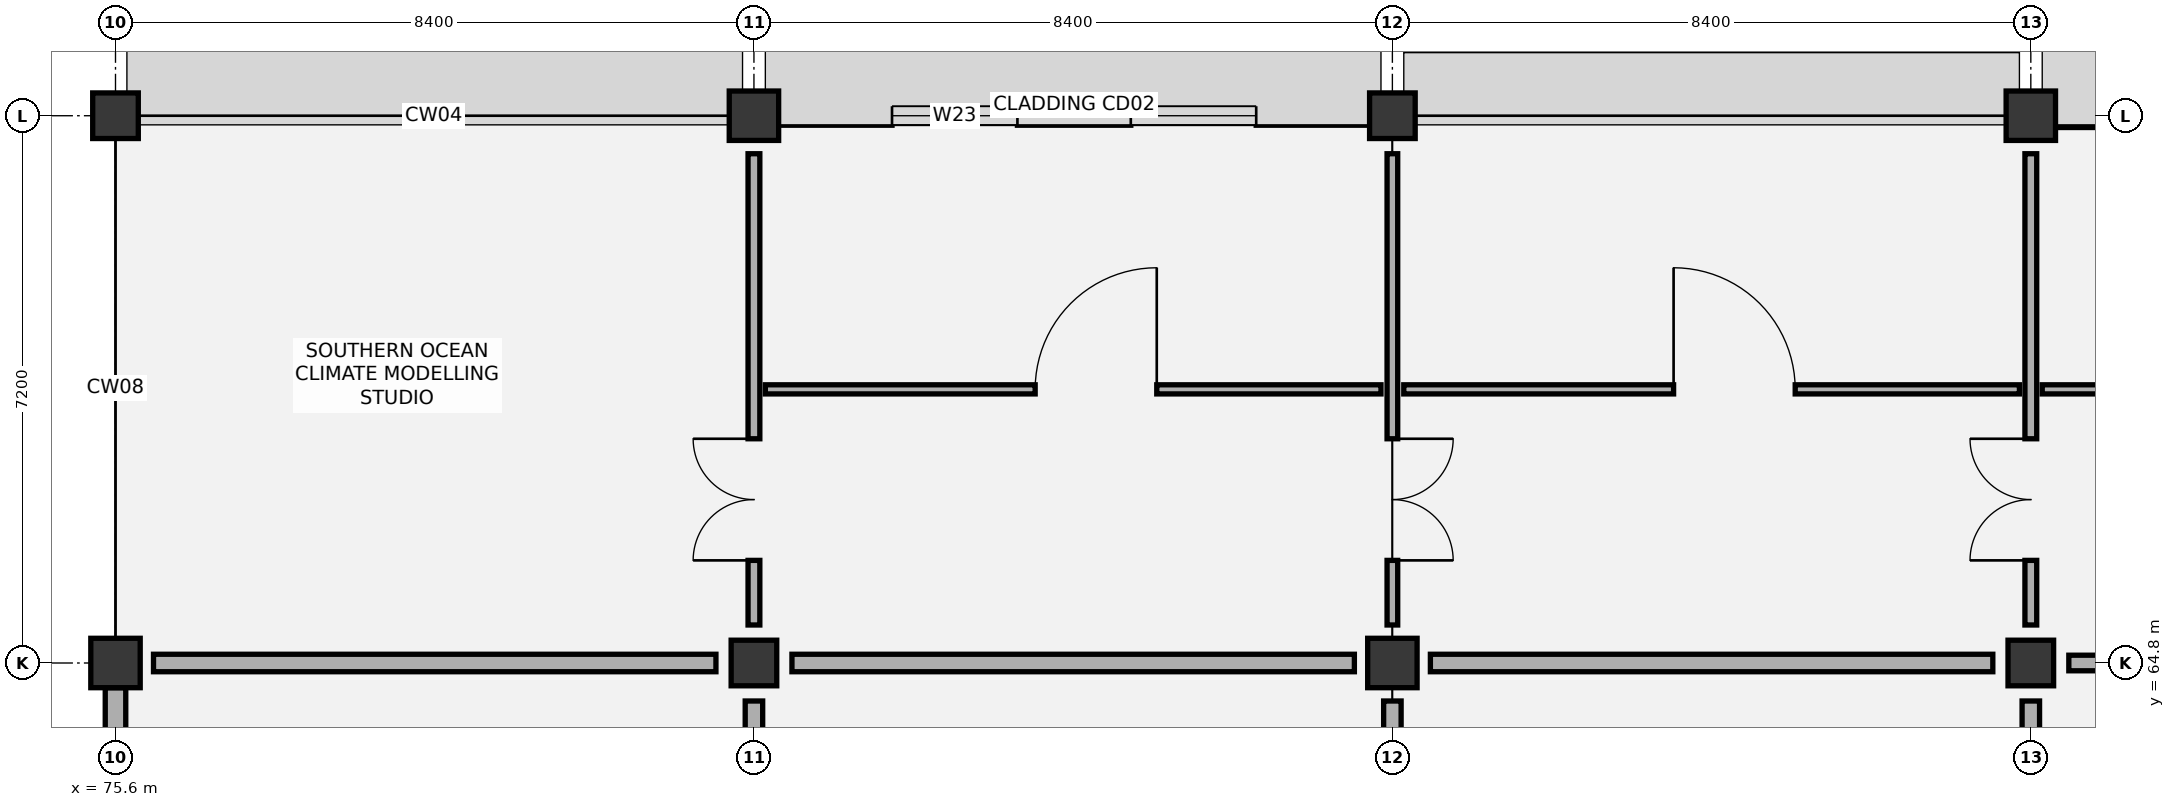
"""IFC4 building model, lengths in metres.
Left out: names, types, materials, properties, quantities, classifications, styles, units other than length and angle.
Written with IfcOpenShell. Run it as: python <this file> out.ifc"""

import sys

from ifc_helpers import new_model, si_unit, direction, frame, frame_2d, origin, origin_2d, place, context, subcontext, project, spatial, rectangle, extrude, element, fill, save


model = new_model("IFC4")
c1 = context("Model", 3, precision=1e-05, world=origin(), true_north=direction((0.0, 1.0)))
c2 = subcontext(c1, "Body", "Model", "MODEL_VIEW")
j1 = project(units=[si_unit("LENGTHUNIT", "METRE"), si_unit("PLANEANGLEUNIT", "RADIAN")], contexts=[c1])
p1 = place(None, origin())
s1 = spatial("IfcSite", under=j1, at=p1, CompositionType="ELEMENT")
p2 = place(p1, origin())
s2 = spatial("IfcBuilding", under=s1, at=p2, CompositionType="ELEMENT")
p3 = place(p2, frame((0.0, 0.0, 52.2)))
s3 = spatial("IfcBuildingStorey", under=s2, at=p3, CompositionType="ELEMENT", Elevation=52.2)
p4 = place(p3, frame((75.6, 64.8, 0.0), z_axis=(0.0, 0.0, 1.0), x_axis=(1.0, 0.0, 0.0)))
e1 = element("IfcColumn", 1, at=p4, inside=s3, PredefinedType="COLUMN", context=c2, shape_type="SweptSolid", body=[
    extrude(rectangle(XDim=0.65, YDim=0.65, at=origin_2d()), origin(), (0.0, 0.0, 1.0), 4.2),
])
for number, where, z_axis, x_axis in (
    (2, (75.6, 72.0, 0.0), (0.0, 0.0, 1.0), (1.0, 0.0, 0.0)),
    (3, (84.0, 64.8, 0.0), (0.0, 0.0, 1.0), (1.0, 0.0, 0.0)),
):
    element("IfcColumn", number, at=place(p3, frame(where, z_axis=z_axis, x_axis=x_axis)), inside=s3, PredefinedType="COLUMN", context=c2, shape_type="SweptSolid", body=[
        extrude(rectangle(XDim=0.6, YDim=0.6, at=origin_2d()), origin(), (0.0, 0.0, 1.0), 4.2),
    ])
for number, where, z_axis, x_axis in (
    (4, (84.0, 72.0, 0.0), (0.0, 0.0, 1.0), (1.0, 0.0, 0.0)),
    (5, (92.4, 64.8, 0.0), (0.0, 0.0, 1.0), (1.0, 0.0, 0.0)),
):
    element("IfcColumn", number, at=place(p3, frame(where, z_axis=z_axis, x_axis=x_axis)), inside=s3, PredefinedType="COLUMN", context=c2, shape_type="SweptSolid", body=[
        extrude(rectangle(XDim=0.65, YDim=0.65, at=origin_2d()), origin(), (0.0, 0.0, 1.0), 4.2),
    ])
for number, where, z_axis, x_axis in (
    (6, (92.4, 72.0, 0.0), (0.0, 0.0, 1.0), (1.0, 0.0, 0.0)),
    (7, (100.8, 64.8, 0.0), (0.0, 0.0, 1.0), (1.0, 0.0, 0.0)),
):
    element("IfcColumn", number, at=place(p3, frame(where, z_axis=z_axis, x_axis=x_axis)), inside=s3, PredefinedType="COLUMN", context=c2, shape_type="SweptSolid", body=[
        extrude(rectangle(XDim=0.6, YDim=0.6, at=origin_2d()), origin(), (0.0, 0.0, 1.0), 4.2),
    ])
p5 = place(p3, frame((100.8, 72.0, 0.0), z_axis=(0.0, 0.0, 1.0), x_axis=(1.0, 0.0, 0.0)))
e8 = element("IfcColumn", 8, at=p5, inside=s3, PredefinedType="COLUMN", context=c2, shape_type="SweptSolid", body=[
    extrude(rectangle(XDim=0.65, YDim=0.65, at=origin_2d()), origin(), (0.0, 0.0, 1.0), 4.2),
])
p6 = place(p3, frame((75.6, 57.9, 0.0), z_axis=(0.0, 0.0, 1.0), x_axis=(0.0, 1.0, 0.0)))
e9 = element("IfcWall", 9, at=p6, inside=s3, PredefinedType="SOLIDWALL", context=c2, shape_type="SweptSolid", body=[
    extrude(rectangle(XDim=6.575, YDim=0.27, at=frame_2d((3.288, 0.0))), origin(), (0.0, 0.0, 1.0), 3.365),
])
p7 = place(p6, frame((1.392, 0.0, 0.95)))
e10 = element("IfcOpeningElement", 10, at=p7, cuts=e9, PredefinedType="OPENING", context=c2, shape_type="SweptSolid", body=[
    extrude(rectangle(XDim=1.2, YDim=1.5, at=frame_2d((0.6, 0.75))), frame((0.0, 0.145, 0.0), z_axis=(0.0, -1.0, 0.0), x_axis=(1.0, 0.0, 0.0)), (0.0, 0.0, 1.0), 0.29),
])
p8 = place(p6, frame((3.983, 0.0, 0.95)))
e11 = element("IfcOpeningElement", 11, at=p8, cuts=e9, PredefinedType="OPENING", context=c2, shape_type="SweptSolid", body=[
    extrude(rectangle(XDim=1.2, YDim=1.5, at=frame_2d((0.6, 0.75))), frame((0.0, 0.145, 0.0), z_axis=(0.0, -1.0, 0.0), x_axis=(1.0, 0.0, 0.0)), (0.0, 0.0, 1.0), 0.29),
])
p9 = place(p3, frame((84.325, 72.0, 0.0), z_axis=(0.0, 0.0, 1.0), x_axis=(1.0, 0.0, 0.0)))
e12 = element("IfcWall", 12, at=p9, inside=s3, PredefinedType="SOLIDWALL", context=c2, shape_type="SweptSolid", body=[
    extrude(rectangle(XDim=7.775, YDim=0.25, at=frame_2d((3.888, 0.0))), origin(), (0.0, 0.0, 1.0), 3.365),
])
p10 = place(p9, frame((1.492, 0.0, 0.95)))
e13 = element("IfcOpeningElement", 13, at=p10, cuts=e12, PredefinedType="OPENING", context=c2, shape_type="SweptSolid", body=[
    extrude(rectangle(XDim=1.65, YDim=1.65, at=frame_2d((0.825, 0.825))), frame((0.0, 0.135, 0.0), z_axis=(0.0, -1.0, 0.0), x_axis=(1.0, 0.0, 0.0)), (0.0, 0.0, 1.0), 0.27),
])
p11 = place(p9, frame((4.633, 0.0, 0.95)))
e14 = element("IfcOpeningElement", 14, at=p11, cuts=e12, PredefinedType="OPENING", context=c2, shape_type="SweptSolid", body=[
    extrude(rectangle(XDim=1.65, YDim=1.65, at=frame_2d((0.825, 0.825))), frame((0.0, 0.135, 0.0), z_axis=(0.0, -1.0, 0.0), x_axis=(1.0, 0.0, 0.0)), (0.0, 0.0, 1.0), 0.27),
])
p12 = place(p3, frame((101.125, 72.0, 0.0), z_axis=(0.0, 0.0, 1.0), x_axis=(1.0, 0.0, 0.0)))
e15 = element("IfcWall", 15, at=p12, inside=s3, PredefinedType="SOLIDWALL", context=c2, shape_type="SweptSolid", body=[
    extrude(rectangle(XDim=7.775, YDim=0.31, at=frame_2d((3.887, 0.0))), origin(), (0.0, 0.0, 1.0), 3.365),
])
p13 = place(p12, frame((1.792, 0.0, 0.95)))
e16 = element("IfcOpeningElement", 16, at=p13, cuts=e15, PredefinedType="OPENING", context=c2, shape_type="SweptSolid", body=[
    extrude(rectangle(XDim=1.2, YDim=1.5, at=frame_2d((0.6, 0.75))), frame((0.0, 0.165, 0.0), z_axis=(0.0, -1.0, 0.0), x_axis=(1.0, 0.0, 0.0)), (0.0, 0.0, 1.0), 0.33),
])
p14 = place(p12, frame((4.783, 0.0, 0.95)))
e17 = element("IfcOpeningElement", 17, at=p14, cuts=e15, PredefinedType="OPENING", context=c2, shape_type="SweptSolid", body=[
    extrude(rectangle(XDim=1.2, YDim=1.5, at=frame_2d((0.6, 0.75))), frame((0.0, 0.165, 0.0), z_axis=(0.0, -1.0, 0.0), x_axis=(1.0, 0.0, 0.0)), (0.0, 0.0, 1.0), 0.33),
])
p15 = place(p3, frame((84.15, 68.4, 0.0), z_axis=(0.0, 0.0, 1.0), x_axis=(1.0, 0.0, 0.0)))
e18 = element("IfcWall", 18, at=p15, inside=s3, PredefinedType="PARTITIONING", context=c2, shape_type="SweptSolid", body=[
    extrude(rectangle(XDim=8.1, YDim=0.12, at=frame_2d((4.05, 0.0))), origin(), (0.0, 0.0, 1.0), 3.92),
])
p16 = place(p15, frame((3.55, 0.0, 0.0)))
e19 = element("IfcOpeningElement", 19, at=p16, cuts=e18, PredefinedType="OPENING", context=c2, shape_type="SweptSolid", body=[
    extrude(rectangle(XDim=1.6, YDim=2.2, at=frame_2d((0.8, 1.1))), frame((0.0, 0.07, 0.0), z_axis=(0.0, -1.0, 0.0), x_axis=(1.0, 0.0, 0.0)), (0.0, 0.0, 1.0), 0.14),
])
p17 = place(p3, frame((92.55, 68.4, 0.0), z_axis=(0.0, 0.0, 1.0), x_axis=(1.0, 0.0, 0.0)))
e20 = element("IfcWall", 20, at=p17, inside=s3, PredefinedType="PARTITIONING", context=c2, shape_type="SweptSolid", body=[
    extrude(rectangle(XDim=8.1, YDim=0.12, at=frame_2d((4.05, 0.0))), origin(), (0.0, 0.0, 1.0), 3.92),
])
p18 = place(p17, frame((3.55, 0.0, 0.0)))
e21 = element("IfcOpeningElement", 21, at=p18, cuts=e20, PredefinedType="OPENING", context=c2, shape_type="SweptSolid", body=[
    extrude(rectangle(XDim=1.6, YDim=2.2, at=frame_2d((0.8, 1.1))), frame((0.0, 0.07, 0.0), z_axis=(0.0, -1.0, 0.0), x_axis=(1.0, 0.0, 0.0)), (0.0, 0.0, 1.0), 0.14),
])
p19 = place(p3, frame((100.95, 68.4, 0.0), z_axis=(0.0, 0.0, 1.0), x_axis=(1.0, 0.0, 0.0)))
e22 = element("IfcWall", 22, at=p19, inside=s3, PredefinedType="PARTITIONING", context=c2, shape_type="SweptSolid", body=[
    extrude(rectangle(XDim=8.1, YDim=0.12, at=frame_2d((4.05, 0.0))), origin(), (0.0, 0.0, 1.0), 3.92),
])
p20 = place(p19, frame((3.55, 0.0, 0.0)))
e23 = element("IfcOpeningElement", 23, at=p20, cuts=e22, PredefinedType="OPENING", context=c2, shape_type="SweptSolid", body=[
    extrude(rectangle(XDim=1.6, YDim=2.2, at=frame_2d((0.8, 1.1))), frame((0.0, 0.07, 0.0), z_axis=(0.0, -1.0, 0.0), x_axis=(1.0, 0.0, 0.0)), (0.0, 0.0, 1.0), 0.14),
])
p21 = place(p3, frame((84.0, 58.1, 0.0), z_axis=(0.0, 0.0, 1.0), x_axis=(0.0, 1.0, 0.0)))
e24 = element("IfcWall", 24, at=p21, inside=s3, PredefinedType="PARTITIONING", context=c2, shape_type="SweptSolid", body=[
    extrude(rectangle(XDim=6.2, YDim=0.23, at=frame_2d((3.1, 0.0))), origin(), (0.0, 0.0, 1.0), 3.415),
])
p22 = place(p21, frame((0.25, 0.0, 0.0)))
e25 = element("IfcOpeningElement", 25, at=p22, cuts=e24, PredefinedType="OPENING", context=c2, shape_type="SweptSolid", body=[
    extrude(rectangle(XDim=1.05, YDim=2.15, at=frame_2d((0.525, 1.075))), frame((0.0, 0.125, 0.0), z_axis=(0.0, -1.0, 0.0), x_axis=(1.0, 0.0, 0.0)), (0.0, 0.0, 1.0), 0.25),
])
p23 = place(p3, frame((76.1, 64.8, 0.0), z_axis=(0.0, 0.0, 1.0), x_axis=(1.0, 0.0, 0.0)))
e26 = element("IfcWall", 26, at=p23, inside=s3, PredefinedType="PARTITIONING", context=c2, shape_type="SweptSolid", body=[
    extrude(rectangle(XDim=7.4, YDim=0.23, at=frame_2d((3.7, 0.0))), origin(), (0.0, 0.0, 1.0), 3.415),
])
p24 = place(p3, frame((84.0, 65.3, 0.0), z_axis=(0.0, 0.0, 1.0), x_axis=(0.0, 1.0, 0.0)))
e27 = element("IfcWall", 27, at=p24, inside=s3, PredefinedType="PARTITIONING", context=c2, shape_type="SweptSolid", body=[
    extrude(rectangle(XDim=6.2, YDim=0.155, at=frame_2d((3.1, 0.0))), origin(), (0.0, 0.0, 1.0), 3.515),
])
p25 = place(p24, frame((0.85, 0.0, 0.0)))
e28 = element("IfcOpeningElement", 28, at=p25, cuts=e27, PredefinedType="OPENING", context=c2, shape_type="SweptSolid", body=[
    extrude(rectangle(XDim=1.6, YDim=2.2, at=frame_2d((0.8, 1.1))), frame((0.0, 0.087, 0.0), z_axis=(0.0, -1.0, 0.0), x_axis=(1.0, 0.0, 0.0)), (0.0, 0.0, 1.0), 0.175),
])
p26 = place(p3, frame((92.4, 58.1, 0.0), z_axis=(0.0, 0.0, 1.0), x_axis=(0.0, 1.0, 0.0)))
e29 = element("IfcWall", 29, at=p26, inside=s3, PredefinedType="PARTITIONING", context=c2, shape_type="SweptSolid", body=[
    extrude(rectangle(XDim=6.2, YDim=0.23, at=frame_2d((3.1, 0.0))), origin(), (0.0, 0.0, 1.0), 3.515),
])
p27 = place(p26, frame((0.25, 0.0, 0.0)))
e30 = element("IfcOpeningElement", 30, at=p27, cuts=e29, PredefinedType="OPENING", context=c2, shape_type="SweptSolid", body=[
    extrude(rectangle(XDim=1.05, YDim=2.15, at=frame_2d((0.525, 1.075))), frame((0.0, 0.125, 0.0), z_axis=(0.0, -1.0, 0.0), x_axis=(1.0, 0.0, 0.0)), (0.0, 0.0, 1.0), 0.25),
])
p28 = place(p3, frame((84.5, 64.8, 0.0), z_axis=(0.0, 0.0, 1.0), x_axis=(1.0, 0.0, 0.0)))
e31 = element("IfcWall", 31, at=p28, inside=s3, PredefinedType="PARTITIONING", context=c2, shape_type="SweptSolid", body=[
    extrude(rectangle(XDim=7.4, YDim=0.23, at=frame_2d((3.7, 0.0))), origin(), (0.0, 0.0, 1.0), 3.465),
])
p29 = place(p3, frame((92.4, 65.3, 0.0), z_axis=(0.0, 0.0, 1.0), x_axis=(0.0, 1.0, 0.0)))
e32 = element("IfcWall", 32, at=p29, inside=s3, PredefinedType="PARTITIONING", context=c2, shape_type="SweptSolid", body=[
    extrude(rectangle(XDim=6.2, YDim=0.14, at=frame_2d((3.1, 0.0))), origin(), (0.0, 0.0, 1.0), 3.415),
])
p30 = place(p29, frame((0.85, 0.0, 0.0)))
e33 = element("IfcOpeningElement", 33, at=p30, cuts=e32, PredefinedType="OPENING", context=c2, shape_type="SweptSolid", body=[
    extrude(rectangle(XDim=1.6, YDim=2.2, at=frame_2d((0.8, 1.1))), frame((0.0, 0.08, 0.0), z_axis=(0.0, -1.0, 0.0), x_axis=(1.0, 0.0, 0.0)), (0.0, 0.0, 1.0), 0.16),
])
p31 = place(p3, frame((100.8, 58.1, 0.0), z_axis=(0.0, 0.0, 1.0), x_axis=(0.0, 1.0, 0.0)))
e34 = element("IfcWall", 34, at=p31, inside=s3, PredefinedType="PARTITIONING", context=c2, shape_type="SweptSolid", body=[
    extrude(rectangle(XDim=6.2, YDim=0.23, at=frame_2d((3.1, 0.0))), origin(), (0.0, 0.0, 1.0), 3.415),
])
p32 = place(p3, frame((92.9, 64.8, 0.0), z_axis=(0.0, 0.0, 1.0), x_axis=(1.0, 0.0, 0.0)))
e35 = element("IfcWall", 35, at=p32, inside=s3, PredefinedType="PARTITIONING", context=c2, shape_type="SweptSolid", body=[
    extrude(rectangle(XDim=7.4, YDim=0.23, at=frame_2d((3.7, 0.0))), origin(), (0.0, 0.0, 1.0), 3.515),
])
p33 = place(p3, frame((100.8, 65.3, 0.0), z_axis=(0.0, 0.0, 1.0), x_axis=(0.0, 1.0, 0.0)))
e36 = element("IfcWall", 36, at=p33, inside=s3, PredefinedType="PARTITIONING", context=c2, shape_type="SweptSolid", body=[
    extrude(rectangle(XDim=6.2, YDim=0.155, at=frame_2d((3.1, 0.0))), origin(), (0.0, 0.0, 1.0), 3.625),
])
p34 = place(p33, frame((0.85, 0.0, 0.0)))
e37 = element("IfcOpeningElement", 37, at=p34, cuts=e36, PredefinedType="OPENING", context=c2, shape_type="SweptSolid", body=[
    extrude(rectangle(XDim=1.6, YDim=2.2, at=frame_2d((0.8, 1.1))), frame((0.0, 0.087, 0.0), z_axis=(0.0, -1.0, 0.0), x_axis=(1.0, 0.0, 0.0)), (0.0, 0.0, 1.0), 0.175),
])
p35 = place(p3, frame((101.3, 64.8, 0.0), z_axis=(0.0, 0.0, 1.0), x_axis=(1.0, 0.0, 0.0)))
e38 = element("IfcWall", 38, at=p35, inside=s3, PredefinedType="PARTITIONING", context=c2, shape_type="SweptSolid", body=[
    extrude(rectangle(XDim=7.4, YDim=0.205, at=frame_2d((3.7, 0.0))), origin(), (0.0, 0.0, 1.0), 3.565),
])
p36 = place(p35, frame((3.05, 0.0, 0.0)))
e39 = element("IfcOpeningElement", 39, at=p36, cuts=e38, PredefinedType="OPENING", context=c2, shape_type="SweptSolid", body=[
    extrude(rectangle(XDim=1.3, YDim=2.15, at=frame_2d((0.65, 1.075))), frame((0.0, 0.113, 0.0), z_axis=(0.0, -1.0, 0.0), x_axis=(1.0, 0.0, 0.0)), (0.0, 0.0, 1.0), 0.225),
])
p37 = place(p10, origin())
e40 = element("IfcWindow", 40, at=p37, inside=s3, PartitioningType="SINGLE_PANEL", PredefinedType="WINDOW", context=c2, shape_type="SweptSolid", body=[
    extrude(rectangle(XDim=1.65, YDim=1.65, at=frame_2d((0.825, 0.825))), frame((0.0, 0.03, 0.0), z_axis=(0.0, -1.0, 0.0), x_axis=(1.0, 0.0, 0.0)), (0.0, 0.0, 1.0), 0.06),
])
fill(e13, e40)
p38 = place(p11, origin())
e41 = element("IfcWindow", 41, at=p38, inside=s3, PartitioningType="SINGLE_PANEL", PredefinedType="WINDOW", context=c2, shape_type="SweptSolid", body=[
    extrude(rectangle(XDim=1.65, YDim=1.65, at=frame_2d((0.825, 0.825))), frame((0.0, 0.03, 0.0), z_axis=(0.0, -1.0, 0.0), x_axis=(1.0, 0.0, 0.0)), (0.0, 0.0, 1.0), 0.06),
])
fill(e14, e41)
p39 = place(p16, origin())
e42 = element("IfcDoor", 42, at=p39, inside=s3, OperationType="SINGLE_SWING_RIGHT", PredefinedType="DOOR", context=c2, shape_type="SweptSolid", body=[
    extrude(rectangle(XDim=1.6, YDim=2.2, at=frame_2d((0.8, 1.1))), frame((0.0, 0.025, 0.0), z_axis=(0.0, -1.0, 0.0), x_axis=(1.0, 0.0, 0.0)), (0.0, 0.0, 1.0), 0.05),
])
fill(e19, e42)
p40 = place(p18, origin())
e43 = element("IfcDoor", 43, at=p40, inside=s3, OperationType="SINGLE_SWING_LEFT", PredefinedType="DOOR", context=c2, shape_type="SweptSolid", body=[
    extrude(rectangle(XDim=1.6, YDim=2.2, at=frame_2d((0.8, 1.1))), frame((0.0, 0.025, 0.0), z_axis=(0.0, -1.0, 0.0), x_axis=(1.0, 0.0, 0.0)), (0.0, 0.0, 1.0), 0.05),
])
fill(e21, e43)
p41 = place(p25, origin())
e44 = element("IfcDoor", 44, at=p41, inside=s3, OperationType="DOUBLE_DOOR_SINGLE_SWING", PredefinedType="DOOR", context=c2, shape_type="SweptSolid", body=[
    extrude(rectangle(XDim=1.6, YDim=2.2, at=frame_2d((0.8, 1.1))), frame((0.0, 0.025, 0.0), z_axis=(0.0, -1.0, 0.0), x_axis=(1.0, 0.0, 0.0)), (0.0, 0.0, 1.0), 0.05),
])
fill(e28, e44)
p42 = place(p30, frame((1.6, 0.0, 0.0), z_axis=(0.0, 0.0, 1.0), x_axis=(-1.0, 0.0, 0.0)))
e45 = element("IfcDoor", 45, at=p42, inside=s3, OperationType="DOUBLE_DOOR_SINGLE_SWING", PredefinedType="DOOR", context=c2, shape_type="SweptSolid", body=[
    extrude(rectangle(XDim=1.6, YDim=2.2, at=frame_2d((0.8, 1.1))), frame((0.0, 0.025, 0.0), z_axis=(0.0, -1.0, 0.0), x_axis=(1.0, 0.0, 0.0)), (0.0, 0.0, 1.0), 0.05),
])
fill(e33, e45)
p43 = place(p34, origin())
e46 = element("IfcDoor", 46, at=p43, inside=s3, OperationType="DOUBLE_DOOR_SINGLE_SWING", PredefinedType="DOOR", context=c2, shape_type="SweptSolid", body=[
    extrude(rectangle(XDim=1.6, YDim=2.2, at=frame_2d((0.8, 1.1))), frame((0.0, 0.025, 0.0), z_axis=(0.0, -1.0, 0.0), x_axis=(1.0, 0.0, 0.0)), (0.0, 0.0, 1.0), 0.05),
])
fill(e37, e46)
save(model, sys.argv[1])
